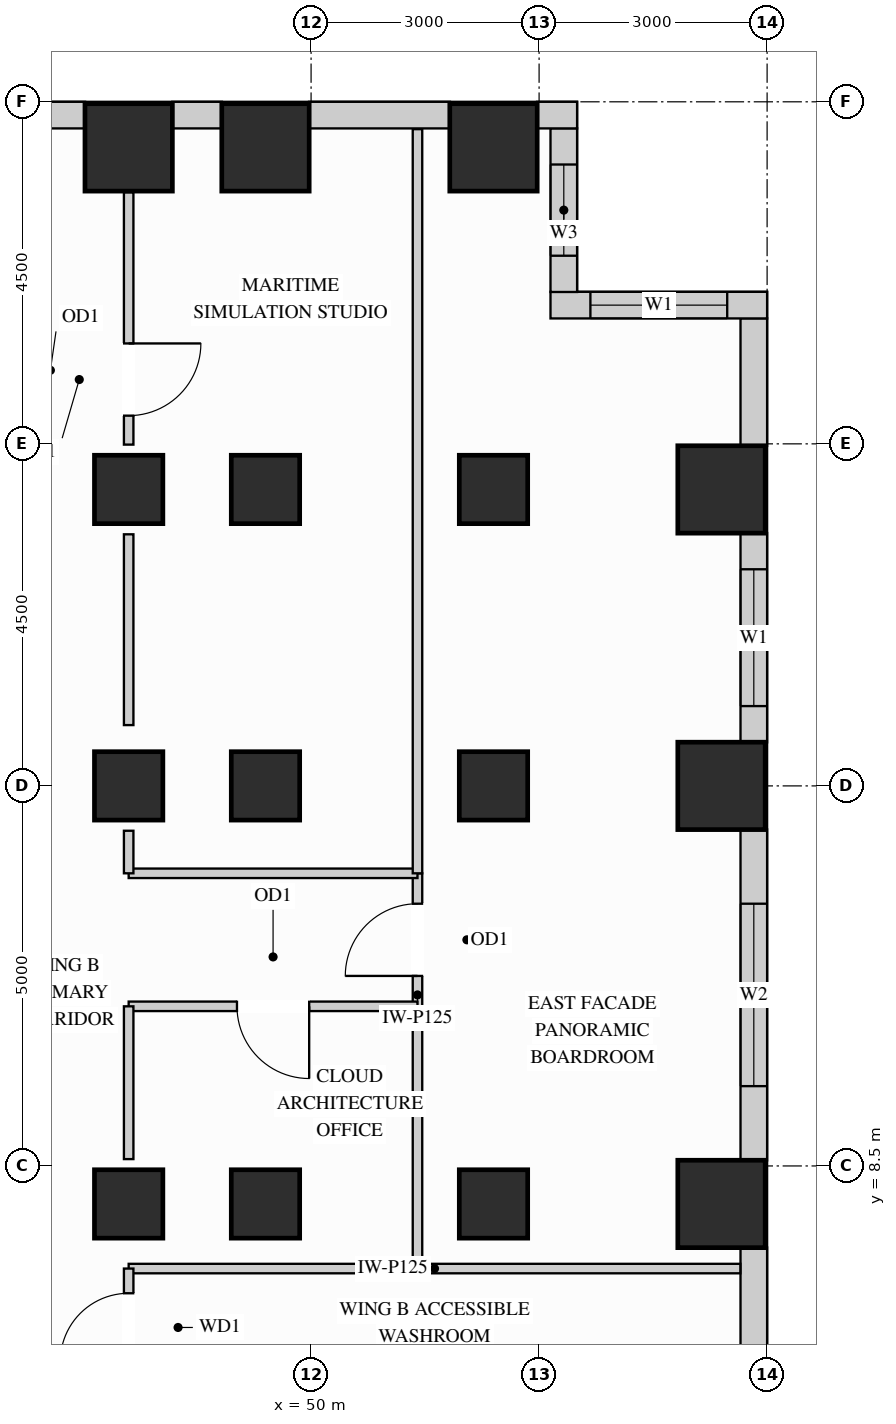
"""IFC4 building model, lengths in metres.
Left out: names, types, materials, properties, quantities, classifications, styles, units other than length and angle.
Written with IfcOpenShell. Run it as: python <this file> out.ifc"""

import sys

from ifc_helpers import new_model, si_unit, direction, frame, frame_2d, origin, origin_2d, place, context, subcontext, project, spatial, rectangle, extrude, source, transform, mapped, element, fill, save


model = new_model("IFC4")
c1 = context("Model", 3, precision=1e-05, world=origin(), true_north=direction((0.0, 1.0)))
c2 = subcontext(c1, "Body", "Model", "MODEL_VIEW")
j1 = project(units=[si_unit("LENGTHUNIT", "METRE"), si_unit("PLANEANGLEUNIT", "RADIAN")], contexts=[c1])
p1 = place(None, origin())
s1 = spatial("IfcSite", under=j1, at=p1, CompositionType="ELEMENT")
p2 = place(p1, origin())
s2 = spatial("IfcBuilding", under=s1, at=p2, CompositionType="ELEMENT")
p3 = place(p2, frame((0.0, 0.0, 102.6)))
s3 = spatial("IfcBuildingStorey", under=s2, at=p3, CompositionType="ELEMENT", Elevation=102.6)
m1 = source(origin(), c2, "Body", "SweptSolid", [
    extrude(rectangle(XDim=0.9, YDim=0.9, at=origin_2d()), origin(), (0.0, 0.0, 1.0), 3.38),
])
for number, where, z_axis, x_axis in (
    (1, (47.6, 13.5, 0.0), (0.0, 0.0, 1.0), (1.0, 0.0, 0.0)),
    (2, (47.6, 8.0, 0.0), (0.0, 0.0, 1.0), (1.0, 0.0, 0.0)),
    (3, (47.6, 17.4, 0.0), (0.0, 0.0, 1.0), (1.0, 0.0, 0.0)),
    (4, (49.4, 13.5, 0.0), (0.0, 0.0, 1.0), (1.0, 0.0, 0.0)),
    (5, (49.4, 17.4, 0.0), (0.0, 0.0, 1.0), (1.0, 0.0, 0.0)),
    (6, (49.4, 8.0, 0.0), (0.0, 0.0, 1.0), (1.0, 0.0, 0.0)),
    (7, (52.4, 13.5, 0.0), (0.0, 0.0, 1.0), (1.0, 0.0, 0.0)),
    (8, (52.4, 17.4, 0.0), (0.0, 0.0, 1.0), (1.0, 0.0, 0.0)),
    (9, (52.4, 8.0, 0.0), (0.0, 0.0, 1.0), (1.0, 0.0, 0.0)),
):
    element("IfcColumn", number, at=place(p3, frame(where, z_axis=z_axis, x_axis=x_axis)), inside=s3, PredefinedType="COLUMN", context=c2, shape_type="MappedRepresentation", body=[
        mapped(m1, transform((0.0, 0.0, 0.0), x_axis=(1.0, 0.0, 0.0), y_axis=(0.0, 1.0, 0.0), z_axis=(0.0, 0.0, 1.0))),
    ])
m2 = source(origin(), c2, "Body", "SweptSolid", [
    extrude(rectangle(XDim=1.15, YDim=1.15, at=origin_2d()), origin(), (0.0, 0.0, 1.0), 3.38),
])
for number, where, z_axis, x_axis in (
    (10, (47.6, 21.9, 0.0), (0.0, 0.0, 1.0), (1.0, 0.0, 0.0)),
    (11, (49.4, 21.9, 0.0), (0.0, 0.0, 1.0), (1.0, 0.0, 0.0)),
    (12, (52.4, 21.9, 0.0), (0.0, 0.0, 1.0), (1.0, 0.0, 0.0)),
    (13, (55.4, 13.5, 0.0), (0.0, 0.0, 1.0), (1.0, 0.0, 0.0)),
    (14, (55.4, 17.4, 0.0), (0.0, 0.0, 1.0), (1.0, 0.0, 0.0)),
    (15, (55.4, 8.0, 0.0), (0.0, 0.0, 1.0), (1.0, 0.0, 0.0)),
):
    element("IfcColumn", number, at=place(p3, frame(where, z_axis=z_axis, x_axis=x_axis)), inside=s3, PredefinedType="COLUMN", context=c2, shape_type="MappedRepresentation", body=[
        mapped(m2, transform((0.0, 0.0, 0.0), x_axis=(1.0, 0.0, 0.0), y_axis=(0.0, 1.0, 0.0), z_axis=(0.0, 0.0, 1.0))),
    ])
m3 = source(origin(), c2, "Body", "SweptSolid", [
    extrude(rectangle(XDim=3.354, YDim=0.35, at=frame_2d((1.677, 0.0))), origin(), (0.0, 0.0, 1.0), 3.365),
])
p4 = place(p3, frame((55.825, 4.073, 0.0), z_axis=(0.0, 0.0, 1.0), x_axis=(0.0, 1.0, 0.0)))
e16 = element("IfcWall", 16, at=p4, inside=s3, PredefinedType="SOLIDWALL", context=c2, shape_type="MappedRepresentation", body=[
    mapped(m3, transform((0.0, 0.0, 0.0), x_axis=(1.0, 0.0, 0.0), y_axis=(0.0, 1.0, 0.0), z_axis=(0.0, 0.0, 1.0))),
])
p5 = place(p3, frame((55.825, 8.573, 0.0), z_axis=(0.0, 0.0, 1.0), x_axis=(0.0, 1.0, 0.0)))
e17 = element("IfcWall", 17, at=p5, inside=s3, PredefinedType="SOLIDWALL", context=c2, shape_type="SweptSolid", body=[
    extrude(rectangle(XDim=4.354, YDim=0.35, at=frame_2d((2.177, 0.0))), origin(), (0.0, 0.0, 1.0), 3.365),
])
p6 = place(p5, frame((0.977, 0.0, 0.78)))
e18 = element("IfcOpeningElement", 18, at=p6, cuts=e17, PredefinedType="OPENING", context=c2, shape_type="SweptSolid", body=[
    extrude(rectangle(XDim=2.4, YDim=2.1, at=frame_2d((1.2, 1.05))), frame((0.0, 0.185, 0.0), z_axis=(0.0, -1.0, 0.0), x_axis=(1.0, 0.0, 0.0)), (0.0, 0.0, 1.0), 0.37),
])
p7 = place(p3, frame((55.825, 14.073, 0.0), z_axis=(0.0, 0.0, 1.0), x_axis=(0.0, 1.0, 0.0)))
e19 = element("IfcWall", 19, at=p7, inside=s3, PredefinedType="SOLIDWALL", context=c2, shape_type="SweptSolid", body=[
    extrude(rectangle(XDim=2.754, YDim=0.35, at=frame_2d((1.377, 0.0))), origin(), (0.0, 0.0, 1.0), 3.365),
])
p8 = place(p7, frame((0.477, 0.0, 0.78)))
e20 = element("IfcOpeningElement", 20, at=p8, cuts=e19, PredefinedType="OPENING", context=c2, shape_type="SweptSolid", body=[
    extrude(rectangle(XDim=1.8, YDim=2.1, at=frame_2d((0.9, 1.05))), frame((0.0, 0.185, 0.0), z_axis=(0.0, -1.0, 0.0), x_axis=(1.0, 0.0, 0.0)), (0.0, 0.0, 1.0), 0.37),
])
m4 = source(origin(), c2, "Body", "SweptSolid", [
    extrude(rectangle(XDim=1.679, YDim=0.35, at=frame_2d((0.84, 0.0))), origin(), (0.0, 0.0, 1.0), 3.365),
])
p9 = place(p3, frame((55.825, 17.973, 0.0), z_axis=(0.0, 0.0, 1.0), x_axis=(0.0, 1.0, 0.0)))
e21 = element("IfcWall", 21, at=p9, inside=s3, PredefinedType="SOLIDWALL", context=c2, shape_type="MappedRepresentation", body=[
    mapped(m4, transform((0.0, 0.0, 0.0), x_axis=(1.0, 0.0, 0.0), y_axis=(0.0, 1.0, 0.0), z_axis=(0.0, 0.0, 1.0))),
])
p10 = place(p3, frame((56.0, 19.825, 0.0), z_axis=(0.0, 0.0, 1.0), x_axis=(-1.0, 0.0, 0.0)))
e22 = element("IfcWall", 22, at=p10, inside=s3, PredefinedType="SOLIDWALL", context=c2, shape_type="SweptSolid", body=[
    extrude(rectangle(XDim=2.85, YDim=0.35, at=frame_2d((1.425, 0.0))), origin(), (0.0, 0.0, 1.0), 3.365),
])
p11 = place(p10, frame((0.525, 0.0, 0.78)))
e23 = element("IfcOpeningElement", 23, at=p11, cuts=e22, PredefinedType="OPENING", context=c2, shape_type="SweptSolid", body=[
    extrude(rectangle(XDim=1.8, YDim=2.1, at=frame_2d((0.9, 1.05))), frame((0.0, 0.185, 0.0), z_axis=(0.0, -1.0, 0.0), x_axis=(1.0, 0.0, 0.0)), (0.0, 0.0, 1.0), 0.37),
])
p12 = place(p3, frame((53.325, 19.998, 0.0), z_axis=(0.0, 0.0, 1.0), x_axis=(0.0, 1.0, 0.0)))
e24 = element("IfcWall", 24, at=p12, inside=s3, PredefinedType="SOLIDWALL", context=c2, shape_type="SweptSolid", body=[
    extrude(rectangle(XDim=2.154, YDim=0.35, at=frame_2d((1.077, 0.0))), origin(), (0.0, 0.0, 1.0), 3.365),
])
p13 = place(p12, frame((0.477, 0.0, 0.78)))
e25 = element("IfcOpeningElement", 25, at=p13, cuts=e24, PredefinedType="OPENING", context=c2, shape_type="SweptSolid", body=[
    extrude(rectangle(XDim=1.2, YDim=2.1, at=frame_2d((0.6, 1.05))), frame((0.0, 0.185, 0.0), z_axis=(0.0, -1.0, 0.0), x_axis=(1.0, 0.0, 0.0)), (0.0, 0.0, 1.0), 0.37),
])
m5 = source(origin(), c2, "Body", "SweptSolid", [
    extrude(rectangle(XDim=0.527, YDim=0.35, at=frame_2d((0.264, 0.0))), origin(), (0.0, 0.0, 1.0), 3.365),
])
p14 = place(p3, frame((53.5, 22.325, 0.0), z_axis=(0.0, 0.0, 1.0), x_axis=(-1.0, 0.0, 0.0)))
e26 = element("IfcWall", 26, at=p14, inside=s3, PredefinedType="SOLIDWALL", context=c2, shape_type="MappedRepresentation", body=[
    mapped(m5, transform((0.0, 0.0, 0.0), x_axis=(1.0, 0.0, 0.0), y_axis=(0.0, 1.0, 0.0), z_axis=(0.0, 0.0, 1.0))),
])
m6 = source(origin(), c2, "Body", "SweptSolid", [
    extrude(rectangle(XDim=1.854, YDim=0.35, at=frame_2d((0.927, 0.0))), origin(), (0.0, 0.0, 1.0), 3.365),
])
p15 = place(p3, frame((51.827, 22.325, 0.0), z_axis=(0.0, 0.0, 1.0), x_axis=(-1.0, 0.0, 0.0)))
e27 = element("IfcWall", 27, at=p15, inside=s3, PredefinedType="SOLIDWALL", context=c2, shape_type="MappedRepresentation", body=[
    mapped(m6, transform((0.0, 0.0, 0.0), x_axis=(1.0, 0.0, 0.0), y_axis=(0.0, 1.0, 0.0), z_axis=(0.0, 0.0, 1.0))),
])
m7 = source(origin(), c2, "Body", "SweptSolid", [
    extrude(rectangle(XDim=0.654, YDim=0.35, at=frame_2d((0.327, 0.0))), origin(), (0.0, 0.0, 1.0), 3.365),
])
p16 = place(p3, frame((48.827, 22.325, 0.0), z_axis=(0.0, 0.0, 1.0), x_axis=(-1.0, 0.0, 0.0)))
e28 = element("IfcWall", 28, at=p16, inside=s3, PredefinedType="SOLIDWALL", context=c2, shape_type="MappedRepresentation", body=[
    mapped(m7, transform((0.0, 0.0, 0.0), x_axis=(1.0, 0.0, 0.0), y_axis=(0.0, 1.0, 0.0), z_axis=(0.0, 0.0, 1.0))),
])
p17 = place(p3, frame((47.027, 22.325, 0.0), z_axis=(0.0, 0.0, 1.0), x_axis=(-1.0, 0.0, 0.0)))
e29 = element("IfcWall", 29, at=p17, inside=s3, PredefinedType="SOLIDWALL", context=c2, shape_type="SweptSolid", body=[
    extrude(rectangle(XDim=6.454, YDim=0.35, at=frame_2d((3.227, 0.0))), origin(), (0.0, 0.0, 1.0), 3.365),
])
p18 = place(p17, frame((1.749, 0.0, 0.78)))
e30 = element("IfcOpeningElement", 30, at=p18, cuts=e29, PredefinedType="OPENING", context=c2, shape_type="SweptSolid", body=[
    extrude(rectangle(XDim=1.8, YDim=2.1, at=frame_2d((0.9, 1.05))), frame((0.0, 0.185, 0.0), z_axis=(0.0, -1.0, 0.0), x_axis=(1.0, 0.0, 0.0)), (0.0, 0.0, 1.0), 0.37),
])
p19 = place(p17, frame((3.942, 0.0, 0.78)))
e31 = element("IfcOpeningElement", 31, at=p19, cuts=e29, PredefinedType="OPENING", context=c2, shape_type="SweptSolid", body=[
    extrude(rectangle(XDim=1.8, YDim=2.1, at=frame_2d((0.9, 1.05))), frame((0.0, 0.185, 0.0), z_axis=(0.0, -1.0, 0.0), x_axis=(1.0, 0.0, 0.0)), (0.0, 0.0, 1.0), 0.37),
])
p20 = place(p3, frame((51.4, 10.6, 0.0), z_axis=(0.0, 0.0, 1.0), x_axis=(0.0, 1.0, 0.0)))
e32 = element("IfcWall", 32, at=p20, inside=s3, PredefinedType="PARTITIONING", context=c2, shape_type="SweptSolid", body=[
    extrude(rectangle(XDim=1.75, YDim=0.125, at=frame_2d((0.875, 0.0))), origin(), (0.0, 0.0, 1.0), 3.365),
])
p21 = place(p20, frame((0.4, 0.0, 0.0)))
e33 = element("IfcOpeningElement", 33, at=p21, cuts=e32, PredefinedType="OPENING", context=c2, shape_type="SweptSolid", body=[
    extrude(rectangle(XDim=0.95, YDim=2.15, at=frame_2d((0.475, 1.075))), frame((0.0, 0.073, 0.0), z_axis=(0.0, -1.0, 0.0), x_axis=(1.0, 0.0, 0.0)), (0.0, 0.0, 1.0), 0.145),
])
m8 = source(origin(), c2, "Body", "SweptSolid", [
    extrude(rectangle(XDim=8.048, YDim=0.125, at=frame_2d((4.024, 0.0))), origin(), (0.0, 0.0, 1.0), 3.365),
])
p22 = place(p3, frame((47.6, 7.15, 0.0), z_axis=(0.0, 0.0, 1.0), x_axis=(1.0, 0.0, 0.0)))
e34 = element("IfcWall", 34, at=p22, inside=s3, PredefinedType="PARTITIONING", context=c2, shape_type="MappedRepresentation", body=[
    mapped(m8, transform((0.0, 0.0, 0.0), x_axis=(1.0, 0.0, 0.0), y_axis=(0.0, 1.0, 0.0), z_axis=(0.0, 0.0, 1.0))),
])
m9 = source(origin(), c2, "Body", "SweptSolid", [
    extrude(rectangle(XDim=3.8, YDim=0.125, at=frame_2d((1.9, 0.0))), origin(), (0.0, 0.0, 1.0), 3.365),
])
p23 = place(p3, frame((47.6, 12.35, 0.0), z_axis=(0.0, 0.0, 1.0), x_axis=(1.0, 0.0, 0.0)))
e35 = element("IfcWall", 35, at=p23, inside=s3, PredefinedType="PARTITIONING", context=c2, shape_type="MappedRepresentation", body=[
    mapped(m9, transform((0.0, 0.0, 0.0), x_axis=(1.0, 0.0, 0.0), y_axis=(0.0, 1.0, 0.0), z_axis=(0.0, 0.0, 1.0))),
])
p24 = place(p3, frame((47.6, 10.6, 0.0), z_axis=(0.0, 0.0, 1.0), x_axis=(1.0, 0.0, 0.0)))
e36 = element("IfcWall", 36, at=p24, inside=s3, PredefinedType="PARTITIONING", context=c2, shape_type="SweptSolid", body=[
    extrude(rectangle(XDim=3.8, YDim=0.125, at=frame_2d((1.9, 0.0))), origin(), (0.0, 0.0, 1.0), 2.677),
])
p25 = place(p24, frame((1.425, 0.0, 0.0)))
e37 = element("IfcOpeningElement", 37, at=p25, cuts=e36, PredefinedType="OPENING", context=c2, shape_type="SweptSolid", body=[
    extrude(rectangle(XDim=0.95, YDim=2.15, at=frame_2d((0.475, 1.075))), frame((0.0, 0.073, 0.0), z_axis=(0.0, -1.0, 0.0), x_axis=(1.0, 0.0, 0.0)), (0.0, 0.0, 1.0), 0.145),
])
m10 = source(origin(), c2, "Body", "SweptSolid", [
    extrude(rectangle(XDim=3.45, YDim=0.125, at=frame_2d((1.725, 0.0))), origin(), (0.0, 0.0, 1.0), 3.365),
])
p26 = place(p3, frame((51.4, 7.15, 0.0), z_axis=(0.0, 0.0, 1.0), x_axis=(0.0, 1.0, 0.0)))
e38 = element("IfcWall", 38, at=p26, inside=s3, PredefinedType="PARTITIONING", context=c2, shape_type="MappedRepresentation", body=[
    mapped(m10, transform((0.0, 0.0, 0.0), x_axis=(1.0, 0.0, 0.0), y_axis=(0.0, 1.0, 0.0), z_axis=(0.0, 0.0, 1.0))),
])
m11 = source(origin(), c2, "Body", "SweptSolid", [
    extrude(rectangle(XDim=9.79, YDim=0.125, at=frame_2d((4.895, 0.0))), origin(), (0.0, 0.0, 1.0), 3.365),
])
p27 = place(p3, frame((51.4, 12.35, 0.0), z_axis=(0.0, 0.0, 1.0), x_axis=(0.0, 1.0, 0.0)))
e39 = element("IfcWall", 39, at=p27, inside=s3, PredefinedType="PARTITIONING", context=c2, shape_type="MappedRepresentation", body=[
    mapped(m11, transform((0.0, 0.0, 0.0), x_axis=(1.0, 0.0, 0.0), y_axis=(0.0, 1.0, 0.0), z_axis=(0.0, 0.0, 1.0))),
])
m12 = source(origin(), c2, "Body", "SweptSolid", [
    extrude(rectangle(XDim=2.01, YDim=0.125, at=frame_2d((1.005, 0.0))), origin(), (0.0, 0.0, 1.0), 2.677),
])
p28 = place(p3, frame((47.6, 8.59, 0.0), z_axis=(0.0, 0.0, 1.0), x_axis=(0.0, 1.0, 0.0)))
e40 = element("IfcWall", 40, at=p28, inside=s3, PredefinedType="PARTITIONING", context=c2, shape_type="MappedRepresentation", body=[
    mapped(m12, transform((0.0, 0.0, 0.0), x_axis=(1.0, 0.0, 0.0), y_axis=(0.0, 1.0, 0.0), z_axis=(0.0, 0.0, 1.0))),
])
m13 = source(origin(), c2, "Body", "SweptSolid", [
    extrude(rectangle(XDim=2.51, YDim=0.125, at=frame_2d((1.255, 0.0))), origin(), (0.0, 0.0, 1.0), 2.677),
])
p29 = place(p3, frame((47.6, 14.3, 0.0), z_axis=(0.0, 0.0, 1.0), x_axis=(0.0, 1.0, 0.0)))
e41 = element("IfcWall", 41, at=p29, inside=s3, PredefinedType="PARTITIONING", context=c2, shape_type="MappedRepresentation", body=[
    mapped(m13, transform((0.0, 0.0, 0.0), x_axis=(1.0, 0.0, 0.0), y_axis=(0.0, 1.0, 0.0), z_axis=(0.0, 0.0, 1.0))),
])
p30 = place(p3, frame((47.6, 17.99, 0.0), z_axis=(0.0, 0.0, 1.0), x_axis=(0.0, 1.0, 0.0)))
e42 = element("IfcWall", 42, at=p30, inside=s3, PredefinedType="PARTITIONING", context=c2, shape_type="SweptSolid", body=[
    extrude(rectangle(XDim=3.32, YDim=0.125, at=frame_2d((1.66, 0.0))), origin(), (0.0, 0.0, 1.0), 2.677),
])
p31 = place(p30, frame((0.381, 0.0, 0.0)))
e43 = element("IfcOpeningElement", 43, at=p31, cuts=e42, PredefinedType="OPENING", context=c2, shape_type="SweptSolid", body=[
    extrude(rectangle(XDim=0.95, YDim=2.15, at=frame_2d((0.475, 1.075))), frame((0.0, 0.073, 0.0), z_axis=(0.0, -1.0, 0.0), x_axis=(1.0, 0.0, 0.0)), (0.0, 0.0, 1.0), 0.145),
])
m14 = source(origin(), c2, "Body", "SweptSolid", [
    extrude(rectangle(XDim=0.56, YDim=0.125, at=frame_2d((0.28, 0.0))), origin(), (0.0, 0.0, 1.0), 2.677),
])
p32 = place(p3, frame((47.6, 12.35, 0.0), z_axis=(0.0, 0.0, 1.0), x_axis=(0.0, 1.0, 0.0)))
e44 = element("IfcWall", 44, at=p32, inside=s3, PredefinedType="PARTITIONING", context=c2, shape_type="MappedRepresentation", body=[
    mapped(m14, transform((0.0, 0.0, 0.0), x_axis=(1.0, 0.0, 0.0), y_axis=(0.0, 1.0, 0.0), z_axis=(0.0, 0.0, 1.0))),
])
p33 = place(p3, frame((47.6, 5.65, 0.0), z_axis=(0.0, 0.0, 1.0), x_axis=(0.0, 1.0, 0.0)))
e45 = element("IfcWall", 45, at=p33, inside=s3, PredefinedType="PARTITIONING", context=c2, shape_type="SweptSolid", body=[
    extrude(rectangle(XDim=1.5, YDim=0.125, at=frame_2d((0.75, 0.0))), origin(), (0.0, 0.0, 1.0), 2.677),
])
p34 = place(p33, frame((0.275, 0.0, 0.0)))
e46 = element("IfcOpeningElement", 46, at=p34, cuts=e45, PredefinedType="OPENING", context=c2, shape_type="SweptSolid", body=[
    extrude(rectangle(XDim=0.9, YDim=2.15, at=frame_2d((0.45, 1.075))), frame((0.0, 0.073, 0.0), z_axis=(0.0, -1.0, 0.0), x_axis=(1.0, 0.0, 0.0)), (0.0, 0.0, 1.0), 0.145),
])
m15 = source(origin(), c2, "Body", "SweptSolid", [
    extrude(rectangle(XDim=0.95, YDim=2.15, at=frame_2d((0.475, 1.075))), frame((0.0, 0.025, 0.0), z_axis=(0.0, -1.0, 0.0), x_axis=(1.0, 0.0, 0.0)), (0.0, 0.0, 1.0), 0.05),
])
p35 = place(p25, origin())
e47 = element("IfcDoor", 47, at=p35, inside=s3, OperationType="SINGLE_SWING_RIGHT", PredefinedType="DOOR", context=c2, shape_type="MappedRepresentation", body=[
    mapped(m15, transform((0.0, 0.0, 0.0), x_axis=(1.0, 0.0, 0.0), y_axis=(0.0, 1.0, 0.0), z_axis=(0.0, 0.0, 1.0))),
])
fill(e37, e47)
p36 = place(p21, origin())
e48 = element("IfcDoor", 48, at=p36, inside=s3, OperationType="SINGLE_SWING_LEFT", PredefinedType="DOOR", context=c2, shape_type="MappedRepresentation", body=[
    mapped(m15, transform((0.0, 0.0, 0.0), x_axis=(1.0, 0.0, 0.0), y_axis=(0.0, 1.0, 0.0), z_axis=(0.0, 0.0, 1.0))),
])
fill(e33, e48)
p37 = place(p31, origin())
e49 = element("IfcDoor", 49, at=p37, inside=s3, OperationType="SINGLE_SWING_RIGHT", PredefinedType="DOOR", context=c2, shape_type="MappedRepresentation", body=[
    mapped(m15, transform((0.0, 0.0, 0.0), x_axis=(1.0, 0.0, 0.0), y_axis=(0.0, 1.0, 0.0), z_axis=(0.0, 0.0, 1.0))),
])
fill(e43, e49)
m16 = source(origin(), c2, "Body", "SweptSolid", [
    extrude(rectangle(XDim=0.9, YDim=2.15, at=frame_2d((0.45, 1.075))), frame((0.0, 0.025, 0.0), z_axis=(0.0, -1.0, 0.0), x_axis=(1.0, 0.0, 0.0)), (0.0, 0.0, 1.0), 0.05),
])
p38 = place(p34, origin())
e50 = element("IfcDoor", 50, at=p38, inside=s3, OperationType="SINGLE_SWING_LEFT", PredefinedType="DOOR", context=c2, shape_type="MappedRepresentation", body=[
    mapped(m16, transform((0.0, 0.0, 0.0), x_axis=(1.0, 0.0, 0.0), y_axis=(0.0, 1.0, 0.0), z_axis=(0.0, 0.0, 1.0))),
])
fill(e46, e50)
m17 = source(origin(), c2, "Body", "SweptSolid", [
    extrude(rectangle(XDim=1.8, YDim=2.1, at=frame_2d((0.9, 1.05))), frame((0.0, 0.03, 0.0), z_axis=(0.0, -1.0, 0.0), x_axis=(1.0, 0.0, 0.0)), (0.0, 0.0, 1.0), 0.06),
])
p39 = place(p8, origin())
e51 = element("IfcWindow", 51, at=p39, inside=s3, PartitioningType="SINGLE_PANEL", PredefinedType="WINDOW", context=c2, shape_type="MappedRepresentation", body=[
    mapped(m17, transform((0.0, 0.0, 0.0), x_axis=(1.0, 0.0, 0.0), y_axis=(0.0, 1.0, 0.0), z_axis=(0.0, 0.0, 1.0))),
])
fill(e20, e51)
p40 = place(p11, origin())
e52 = element("IfcWindow", 52, at=p40, inside=s3, PartitioningType="SINGLE_PANEL", PredefinedType="WINDOW", context=c2, shape_type="MappedRepresentation", body=[
    mapped(m17, transform((0.0, 0.0, 0.0), x_axis=(1.0, 0.0, 0.0), y_axis=(0.0, 1.0, 0.0), z_axis=(0.0, 0.0, 1.0))),
])
fill(e23, e52)
m18 = source(origin(), c2, "Body", "SweptSolid", [
    extrude(rectangle(XDim=2.4, YDim=2.1, at=frame_2d((1.2, 1.05))), frame((0.0, 0.03, 0.0), z_axis=(0.0, -1.0, 0.0), x_axis=(1.0, 0.0, 0.0)), (0.0, 0.0, 1.0), 0.06),
])
p41 = place(p6, origin())
e53 = element("IfcWindow", 53, at=p41, inside=s3, PartitioningType="SINGLE_PANEL", PredefinedType="WINDOW", context=c2, shape_type="MappedRepresentation", body=[
    mapped(m18, transform((0.0, 0.0, 0.0), x_axis=(1.0, 0.0, 0.0), y_axis=(0.0, 1.0, 0.0), z_axis=(0.0, 0.0, 1.0))),
])
fill(e18, e53)
m19 = source(origin(), c2, "Body", "SweptSolid", [
    extrude(rectangle(XDim=1.2, YDim=2.1, at=frame_2d((0.6, 1.05))), frame((0.0, 0.03, 0.0), z_axis=(0.0, -1.0, 0.0), x_axis=(1.0, 0.0, 0.0)), (0.0, 0.0, 1.0), 0.06),
])
p42 = place(p13, origin())
e54 = element("IfcWindow", 54, at=p42, inside=s3, PartitioningType="SINGLE_PANEL", PredefinedType="WINDOW", context=c2, shape_type="MappedRepresentation", body=[
    mapped(m19, transform((0.0, 0.0, 0.0), x_axis=(1.0, 0.0, 0.0), y_axis=(0.0, 1.0, 0.0), z_axis=(0.0, 0.0, 1.0))),
])
fill(e25, e54)
save(model, sys.argv[1])
